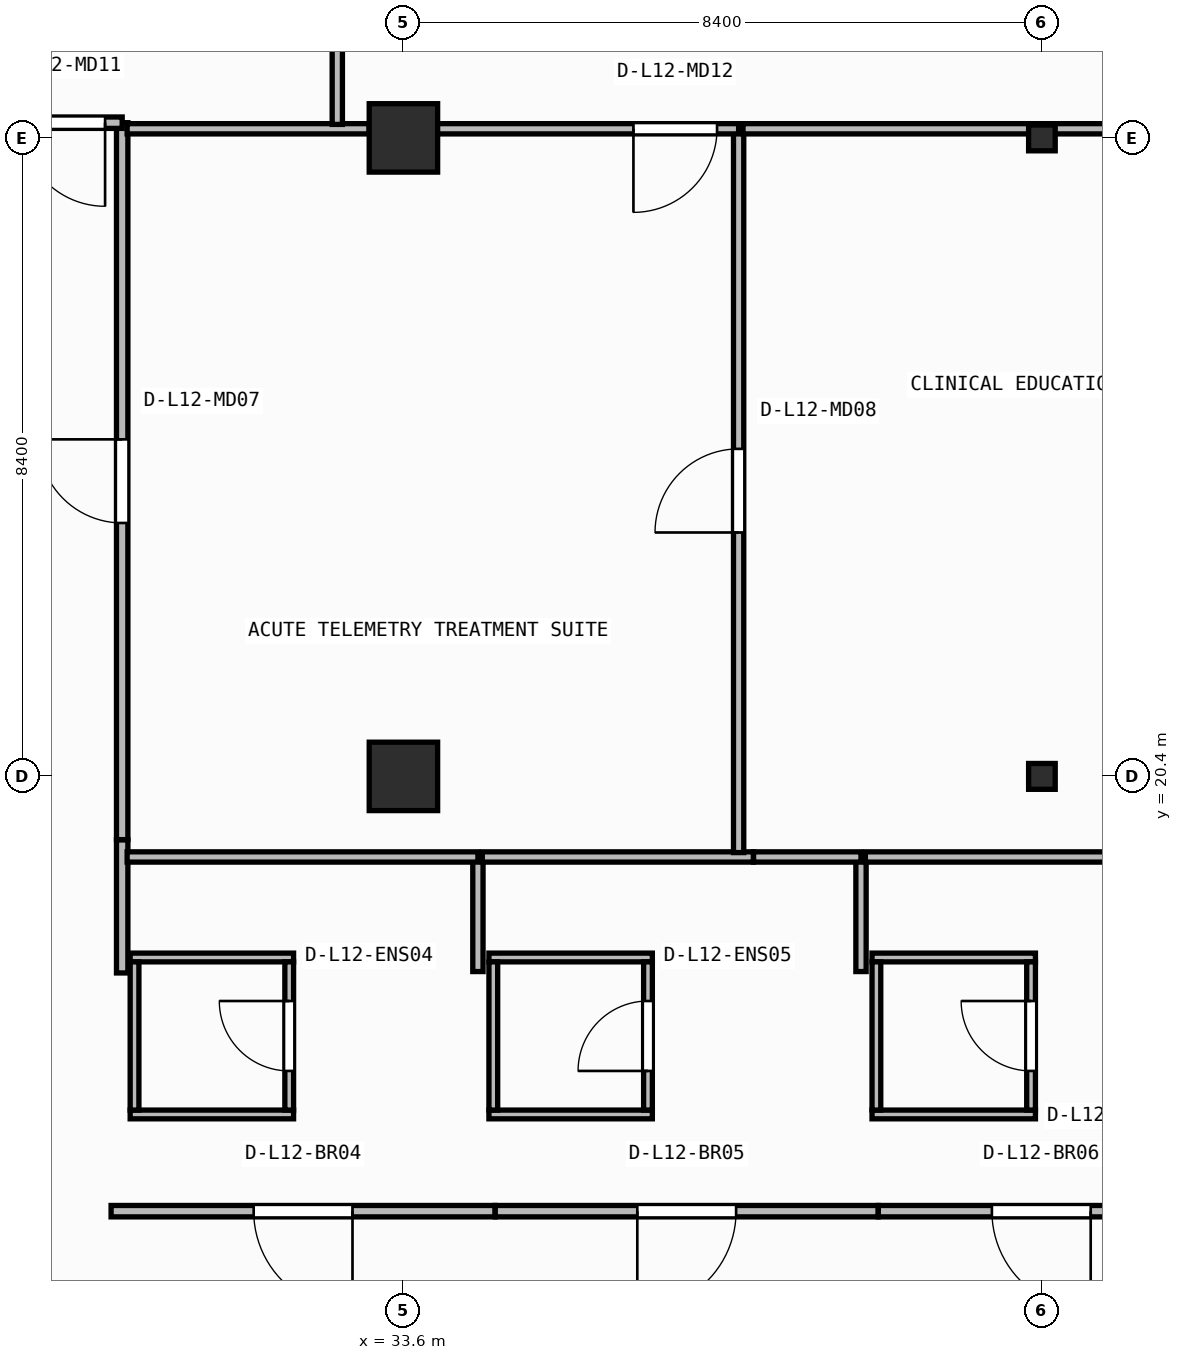
"""IFC4 building model, lengths in metres.
Left out: names, types, materials, properties, quantities, classifications, styles, units other than length and angle.
Written with IfcOpenShell. Run it as: python <this file> out.ifc"""

import sys

from ifc_helpers import new_model, si_unit, direction, frame, frame_2d, origin, origin_2d, place, context, subcontext, project, spatial, rectangle, i_section, extrude, element, fill, save


model = new_model("IFC4")
c1 = context("Model", 3, precision=1e-05, world=origin(), true_north=direction((0.0, 1.0)))
c2 = subcontext(c1, "Body", "Model", "MODEL_VIEW")
j1 = project(units=[si_unit("LENGTHUNIT", "METRE"), si_unit("PLANEANGLEUNIT", "RADIAN")], contexts=[c1])
p1 = place(None, origin())
s1 = spatial("IfcSite", under=j1, at=p1, CompositionType="ELEMENT")
p2 = place(p1, origin())
s2 = spatial("IfcBuilding", under=s1, at=p2, CompositionType="ELEMENT")
p3 = place(p2, frame((0.0, 0.0, 50.15)))
s3 = spatial("IfcBuildingStorey", under=s2, at=p3, CompositionType="ELEMENT", Elevation=50.15)
p4 = place(p3, frame((33.6, 20.4, 0.0), z_axis=(0.0, 0.0, 1.0), x_axis=(1.0, 0.0, 0.0)))
e1 = element("IfcColumn", 1, at=p4, inside=s3, PredefinedType="COLUMN", context=c2, shape_type="SweptSolid", body=[
    extrude(rectangle(XDim=0.9, YDim=0.9, at=origin_2d()), origin(), (0.0, 0.0, 1.0), 3.95),
])
p5 = place(p3, frame((42.0, 20.4, 0.0), z_axis=(0.0, 0.0, 1.0), x_axis=(1.0, 0.0, 0.0)))
e2 = element("IfcColumn", 2, at=p5, inside=s3, PredefinedType="COLUMN", context=c2, shape_type="SweptSolid", body=[
    extrude(i_section(OverallWidth=0.35, OverallDepth=0.34, WebThickness=0.016, FlangeThickness=0.028, at=origin_2d()), origin(), (0.0, 0.0, 1.0), 3.95),
])
p6 = place(p3, frame((33.6, 28.8, 0.0), z_axis=(0.0, 0.0, 1.0), x_axis=(1.0, 0.0, 0.0)))
e3 = element("IfcColumn", 3, at=p6, inside=s3, PredefinedType="COLUMN", context=c2, shape_type="SweptSolid", body=[
    extrude(rectangle(XDim=0.9, YDim=0.9, at=origin_2d()), origin(), (0.0, 0.0, 1.0), 3.95),
])
p7 = place(p3, frame((42.0, 28.8, 0.0), z_axis=(0.0, 0.0, 1.0), x_axis=(1.0, 0.0, 0.0)))
e4 = element("IfcColumn", 4, at=p7, inside=s3, PredefinedType="COLUMN", context=c2, shape_type="SweptSolid", body=[
    extrude(i_section(OverallWidth=0.35, OverallDepth=0.34, WebThickness=0.016, FlangeThickness=0.028, at=origin_2d()), origin(), (0.0, 0.0, 1.0), 3.95),
])
p8 = place(p3, frame((30.005, 15.952, 0.0), z_axis=(0.0, 0.0, 1.0), x_axis=(1.0, 0.0, 0.0)))
e5 = element("IfcWall", 5, at=p8, inside=s3, PredefinedType="PARTITIONING", context=c2, shape_type="SweptSolid", body=[
    extrude(rectangle(XDim=2.15, YDim=0.115, at=frame_2d((1.075, 0.0))), origin(), (0.0, 0.0, 1.0), 3.329),
])
p9 = place(p3, frame((30.005, 18.018, 0.0), z_axis=(0.0, 0.0, 1.0), x_axis=(1.0, 0.0, 0.0)))
e6 = element("IfcWall", 6, at=p9, inside=s3, PredefinedType="PARTITIONING", context=c2, shape_type="SweptSolid", body=[
    extrude(rectangle(XDim=2.15, YDim=0.115, at=frame_2d((1.075, 0.0))), origin(), (0.0, 0.0, 1.0), 3.71),
])
p10 = place(p3, frame((30.062, 16.01, 0.0), z_axis=(0.0, 0.0, 1.0), x_axis=(0.0, 1.0, 0.0)))
e7 = element("IfcWall", 7, at=p10, inside=s3, PredefinedType="PARTITIONING", context=c2, shape_type="SweptSolid", body=[
    extrude(rectangle(XDim=1.95, YDim=0.115, at=frame_2d((0.975, 0.0))), origin(), (0.0, 0.0, 1.0), 3.71),
])
p11 = place(p3, frame((32.097, 16.01, 0.0), z_axis=(0.0, 0.0, 1.0), x_axis=(0.0, 1.0, 0.0)))
e8 = element("IfcWall", 8, at=p11, inside=s3, PredefinedType="PARTITIONING", context=c2, shape_type="SweptSolid", body=[
    extrude(rectangle(XDim=1.95, YDim=0.115, at=frame_2d((0.975, 0.0))), origin(), (0.0, 0.0, 1.0), 3.71),
])
p12 = place(p11, frame((0.515, 0.0, 0.0)))
e9 = element("IfcOpeningElement", 9, at=p12, cuts=e8, PredefinedType="OPENING", context=c2, shape_type="SweptSolid", body=[
    extrude(rectangle(XDim=0.92, YDim=2.1, at=frame_2d((0.46, 1.05))), frame((0.0, 0.067, 0.0), z_axis=(0.0, -1.0, 0.0), x_axis=(1.0, 0.0, 0.0)), (0.0, 0.0, 1.0), 0.135),
])
p13 = place(p3, frame((34.725, 15.952, 0.0), z_axis=(0.0, 0.0, 1.0), x_axis=(1.0, 0.0, 0.0)))
e10 = element("IfcWall", 10, at=p13, inside=s3, PredefinedType="PARTITIONING", context=c2, shape_type="SweptSolid", body=[
    extrude(rectangle(XDim=2.15, YDim=0.115, at=frame_2d((1.075, 0.0))), origin(), (0.0, 0.0, 1.0), 3.329),
])
p14 = place(p3, frame((34.725, 18.018, 0.0), z_axis=(0.0, 0.0, 1.0), x_axis=(1.0, 0.0, 0.0)))
e11 = element("IfcWall", 11, at=p14, inside=s3, PredefinedType="PARTITIONING", context=c2, shape_type="SweptSolid", body=[
    extrude(rectangle(XDim=2.15, YDim=0.115, at=frame_2d((1.075, 0.0))), origin(), (0.0, 0.0, 1.0), 3.71),
])
p15 = place(p3, frame((34.782, 16.01, 0.0), z_axis=(0.0, 0.0, 1.0), x_axis=(0.0, 1.0, 0.0)))
e12 = element("IfcWall", 12, at=p15, inside=s3, PredefinedType="PARTITIONING", context=c2, shape_type="SweptSolid", body=[
    extrude(rectangle(XDim=1.95, YDim=0.115, at=frame_2d((0.975, 0.0))), origin(), (0.0, 0.0, 1.0), 3.71),
])
p16 = place(p3, frame((36.817, 16.01, 0.0), z_axis=(0.0, 0.0, 1.0), x_axis=(0.0, 1.0, 0.0)))
e13 = element("IfcWall", 13, at=p16, inside=s3, PredefinedType="PARTITIONING", context=c2, shape_type="SweptSolid", body=[
    extrude(rectangle(XDim=1.95, YDim=0.115, at=frame_2d((0.975, 0.0))), origin(), (0.0, 0.0, 1.0), 3.71),
])
p17 = place(p16, frame((0.515, 0.0, 0.0)))
e14 = element("IfcOpeningElement", 14, at=p17, cuts=e13, PredefinedType="OPENING", context=c2, shape_type="SweptSolid", body=[
    extrude(rectangle(XDim=0.92, YDim=2.1, at=frame_2d((0.46, 1.05))), frame((0.0, 0.067, 0.0), z_axis=(0.0, -1.0, 0.0), x_axis=(1.0, 0.0, 0.0)), (0.0, 0.0, 1.0), 0.135),
])
p18 = place(p3, frame((39.765, 15.952, 0.0), z_axis=(0.0, 0.0, 1.0), x_axis=(1.0, 0.0, 0.0)))
e15 = element("IfcWall", 15, at=p18, inside=s3, PredefinedType="PARTITIONING", context=c2, shape_type="SweptSolid", body=[
    extrude(rectangle(XDim=2.15, YDim=0.115, at=frame_2d((1.075, 0.0))), origin(), (0.0, 0.0, 1.0), 3.329),
])
p19 = place(p3, frame((39.765, 18.018, 0.0), z_axis=(0.0, 0.0, 1.0), x_axis=(1.0, 0.0, 0.0)))
e16 = element("IfcWall", 16, at=p19, inside=s3, PredefinedType="PARTITIONING", context=c2, shape_type="SweptSolid", body=[
    extrude(rectangle(XDim=2.15, YDim=0.115, at=frame_2d((1.075, 0.0))), origin(), (0.0, 0.0, 1.0), 3.71),
])
p20 = place(p3, frame((39.823, 16.01, 0.0), z_axis=(0.0, 0.0, 1.0), x_axis=(0.0, 1.0, 0.0)))
e17 = element("IfcWall", 17, at=p20, inside=s3, PredefinedType="PARTITIONING", context=c2, shape_type="SweptSolid", body=[
    extrude(rectangle(XDim=1.95, YDim=0.115, at=frame_2d((0.975, 0.0))), origin(), (0.0, 0.0, 1.0), 3.71),
])
p21 = place(p3, frame((41.857, 16.01, 0.0), z_axis=(0.0, 0.0, 1.0), x_axis=(0.0, 1.0, 0.0)))
e18 = element("IfcWall", 18, at=p21, inside=s3, PredefinedType="PARTITIONING", context=c2, shape_type="SweptSolid", body=[
    extrude(rectangle(XDim=1.95, YDim=0.115, at=frame_2d((0.975, 0.0))), origin(), (0.0, 0.0, 1.0), 3.073),
])
p22 = place(p21, frame((0.515, 0.0, 0.0)))
e19 = element("IfcOpeningElement", 19, at=p22, cuts=e18, PredefinedType="OPENING", context=c2, shape_type="SweptSolid", body=[
    extrude(rectangle(XDim=0.92, YDim=2.1, at=frame_2d((0.46, 1.05))), frame((0.0, 0.067, 0.0), z_axis=(0.0, -1.0, 0.0), x_axis=(1.0, 0.0, 0.0)), (0.0, 0.0, 1.0), 0.135),
])
p23 = place(p3, frame((34.806, 14.68, 0.0), z_axis=(0.0, 0.0, 1.0), x_axis=(-1.0, 0.0, 0.0)))
e20 = element("IfcWall", 20, at=p23, inside=s3, PredefinedType="PARTITIONING", context=c2, shape_type="SweptSolid", body=[
    extrude(rectangle(XDim=5.052, YDim=0.15, at=frame_2d((2.526, 0.0))), origin(), (0.0, 0.0, 1.0), 3.71),
])
p24 = place(p23, frame((1.876, 0.0, 0.0)))
e21 = element("IfcOpeningElement", 21, at=p24, cuts=e20, PredefinedType="OPENING", context=c2, shape_type="SweptSolid", body=[
    extrude(rectangle(XDim=1.3, YDim=2.15, at=frame_2d((0.65, 1.075))), frame((0.0, 0.085, 0.0), z_axis=(0.0, -1.0, 0.0), x_axis=(1.0, 0.0, 0.0)), (0.0, 0.0, 1.0), 0.17),
])
p25 = place(p3, frame((39.846, 14.68, 0.0), z_axis=(0.0, 0.0, 1.0), x_axis=(-1.0, 0.0, 0.0)))
e22 = element("IfcWall", 22, at=p25, inside=s3, PredefinedType="PARTITIONING", context=c2, shape_type="SweptSolid", body=[
    extrude(rectangle(XDim=5.038, YDim=0.15, at=frame_2d((2.519, 0.0))), origin(), (0.0, 0.0, 1.0), 3.71),
])
p26 = place(p25, frame((1.869, 0.0, 0.0)))
e23 = element("IfcOpeningElement", 23, at=p26, cuts=e22, PredefinedType="OPENING", context=c2, shape_type="SweptSolid", body=[
    extrude(rectangle(XDim=1.3, YDim=2.15, at=frame_2d((0.65, 1.075))), frame((0.0, 0.085, 0.0), z_axis=(0.0, -1.0, 0.0), x_axis=(1.0, 0.0, 0.0)), (0.0, 0.0, 1.0), 0.17),
])
p27 = place(p3, frame((44.136, 14.68, 0.0), z_axis=(0.0, 0.0, 1.0), x_axis=(-1.0, 0.0, 0.0)))
e24 = element("IfcWall", 24, at=p27, inside=s3, PredefinedType="PARTITIONING", context=c2, shape_type="SweptSolid", body=[
    extrude(rectangle(XDim=4.288, YDim=0.15, at=frame_2d((2.144, 0.0))), origin(), (0.0, 0.0, 1.0), 3.71),
])
p28 = place(p27, frame((1.494, 0.0, 0.0)))
e25 = element("IfcOpeningElement", 25, at=p28, cuts=e24, PredefinedType="OPENING", context=c2, shape_type="SweptSolid", body=[
    extrude(rectangle(XDim=1.3, YDim=2.15, at=frame_2d((0.65, 1.075))), frame((0.0, 0.085, 0.0), z_axis=(0.0, -1.0, 0.0), x_axis=(1.0, 0.0, 0.0)), (0.0, 0.0, 1.0), 0.17),
])
p29 = place(p3, frame((29.9, 17.814, 0.0), z_axis=(0.0, 0.0, 1.0), x_axis=(0.0, 1.0, 0.0)))
e26 = element("IfcWall", 26, at=p29, inside=s3, PredefinedType="PARTITIONING", context=c2, shape_type="SweptSolid", body=[
    extrude(rectangle(XDim=1.752, YDim=0.15, at=frame_2d((0.876, 0.0))), origin(), (0.0, 0.0, 1.0), 3.71),
])
p30 = place(p3, frame((29.9, 19.568, 0.0), z_axis=(0.0, 0.0, 1.0), x_axis=(0.0, 1.0, 0.0)))
e27 = element("IfcWall", 27, at=p30, inside=s3, PredefinedType="PARTITIONING", context=c2, shape_type="SweptSolid", body=[
    extrude(rectangle(XDim=9.432, YDim=0.15, at=frame_2d((4.716, 0.0))), origin(), (0.0, 0.0, 1.0), 3.71),
])
p31 = place(p30, frame((4.166, 0.0, 0.0)))
e28 = element("IfcOpeningElement", 28, at=p31, cuts=e27, PredefinedType="OPENING", context=c2, shape_type="SweptSolid", body=[
    extrude(rectangle(XDim=1.1, YDim=2.1, at=frame_2d((0.55, 1.05))), frame((0.0, 0.085, 0.0), z_axis=(0.0, -1.0, 0.0), x_axis=(1.0, 0.0, 0.0)), (0.0, 0.0, 1.0), 0.17),
])
p32 = place(p3, frame((29.9, 29.0, 0.0), z_axis=(0.0, 0.0, 1.0), x_axis=(-1.0, 0.0, 0.0)))
e29 = element("IfcWall", 29, at=p32, inside=s3, PredefinedType="PARTITIONING", context=c2, shape_type="SweptSolid", body=[
    extrude(rectangle(XDim=2.5, YDim=0.15, at=frame_2d((1.25, 0.0))), origin(), (0.0, 0.0, 1.0), 3.279),
])
p33 = place(p32, frame((0.225, 0.0, 0.0)))
e30 = element("IfcOpeningElement", 30, at=p33, cuts=e29, PredefinedType="OPENING", context=c2, shape_type="SweptSolid", body=[
    extrude(rectangle(XDim=1.1, YDim=2.1, at=frame_2d((0.55, 1.05))), frame((0.0, 0.085, 0.0), z_axis=(0.0, -1.0, 0.0), x_axis=(1.0, 0.0, 0.0)), (0.0, 0.0, 1.0), 0.17),
])
p34 = place(p3, frame((34.58, 17.833, 0.0), z_axis=(0.0, 0.0, 1.0), x_axis=(0.0, 1.0, 0.0)))
e31 = element("IfcWall", 31, at=p34, inside=s3, PredefinedType="PARTITIONING", context=c2, shape_type="SweptSolid", body=[
    extrude(rectangle(XDim=1.508, YDim=0.135, at=frame_2d((0.754, 0.0))), origin(), (0.0, 0.0, 1.0), 3.71),
])
p35 = place(p3, frame((34.58, 19.34, 0.0), z_axis=(0.0, 0.0, 1.0), x_axis=(-1.0, 0.0, 0.0)))
e32 = element("IfcWall", 32, at=p35, inside=s3, PredefinedType="PARTITIONING", context=c2, shape_type="SweptSolid", body=[
    extrude(rectangle(XDim=4.615, YDim=0.135, at=frame_2d((2.308, 0.0))), origin(), (0.0, 0.0, 1.0), 3.71),
])
p36 = place(p3, frame((39.62, 17.833, 0.0), z_axis=(0.0, 0.0, 1.0), x_axis=(0.0, 1.0, 0.0)))
e33 = element("IfcWall", 33, at=p36, inside=s3, PredefinedType="PARTITIONING", context=c2, shape_type="SweptSolid", body=[
    extrude(rectangle(XDim=1.508, YDim=0.135, at=frame_2d((0.754, 0.0))), origin(), (0.0, 0.0, 1.0), 3.71),
])
p37 = place(p3, frame((38.205, 19.34, 0.0), z_axis=(0.0, 0.0, 1.0), x_axis=(-1.0, 0.0, 0.0)))
e34 = element("IfcWall", 34, at=p37, inside=s3, PredefinedType="PARTITIONING", context=c2, shape_type="SweptSolid", body=[
    extrude(rectangle(XDim=3.567, YDim=0.135, at=frame_2d((1.784, 0.0))), origin(), (0.0, 0.0, 1.0), 3.71),
])
p38 = place(p3, frame((39.62, 19.34, 0.0), z_axis=(0.0, 0.0, 1.0), x_axis=(-1.0, 0.0, 0.0)))
e35 = element("IfcWall", 35, at=p38, inside=s3, PredefinedType="PARTITIONING", context=c2, shape_type="SweptSolid", body=[
    extrude(rectangle(XDim=1.414, YDim=0.135, at=frame_2d((0.707, 0.0))), origin(), (0.0, 0.0, 1.0), 3.71),
])
p39 = place(p3, frame((43.91, 19.34, 0.0), z_axis=(0.0, 0.0, 1.0), x_axis=(-1.0, 0.0, 0.0)))
e36 = element("IfcWall", 36, at=p39, inside=s3, PredefinedType="PARTITIONING", context=c2, shape_type="SweptSolid", body=[
    extrude(rectangle(XDim=4.232, YDim=0.135, at=frame_2d((2.116, 0.0))), origin(), (0.0, 0.0, 1.0), 3.71),
])
p40 = place(p3, frame((38.01, 19.397, 0.0), z_axis=(0.0, 0.0, 1.0), x_axis=(0.0, 1.0, 0.0)))
e37 = element("IfcWall", 37, at=p40, inside=s3, PredefinedType="PARTITIONING", context=c2, shape_type="SweptSolid", body=[
    extrude(rectangle(XDim=9.522, YDim=0.135, at=frame_2d((4.761, 0.0))), origin(), (0.0, 0.0, 1.0), 3.71),
])
p41 = place(p40, frame((4.211, 0.0, 0.0)))
e38 = element("IfcOpeningElement", 38, at=p41, cuts=e37, PredefinedType="OPENING", context=c2, shape_type="SweptSolid", body=[
    extrude(rectangle(XDim=1.1, YDim=2.1, at=frame_2d((0.55, 1.05))), frame((0.0, 0.077, 0.0), z_axis=(0.0, -1.0, 0.0), x_axis=(1.0, 0.0, 0.0)), (0.0, 0.0, 1.0), 0.155),
])
p42 = place(p3, frame((33.15, 28.92, 0.0), z_axis=(0.0, 0.0, 1.0), x_axis=(-1.0, 0.0, 0.0)))
e39 = element("IfcWall", 39, at=p42, inside=s3, PredefinedType="PARTITIONING", context=c2, shape_type="SweptSolid", body=[
    extrude(rectangle(XDim=3.185, YDim=0.135, at=frame_2d((1.592, 0.0))), origin(), (0.0, 0.0, 1.0), 3.279),
])
p43 = place(p3, frame((38.01, 28.92, 0.0), z_axis=(0.0, 0.0, 1.0), x_axis=(-1.0, 0.0, 0.0)))
e40 = element("IfcWall", 40, at=p43, inside=s3, PredefinedType="PARTITIONING", context=c2, shape_type="SweptSolid", body=[
    extrude(rectangle(XDim=4.858, YDim=0.135, at=frame_2d((2.429, 0.0))), origin(), (0.0, 0.0, 1.0), 3.279),
])
p44 = place(p43, frame((0.284, 0.0, 0.0)))
e41 = element("IfcOpeningElement", 41, at=p44, cuts=e40, PredefinedType="OPENING", context=c2, shape_type="SweptSolid", body=[
    extrude(rectangle(XDim=1.1, YDim=2.1, at=frame_2d((0.55, 1.05))), frame((0.0, 0.077, 0.0), z_axis=(0.0, -1.0, 0.0), x_axis=(1.0, 0.0, 0.0)), (0.0, 0.0, 1.0), 0.155),
])
p45 = place(p3, frame((47.44, 28.92, 0.0), z_axis=(0.0, 0.0, 1.0), x_axis=(-1.0, 0.0, 0.0)))
e42 = element("IfcWall", 42, at=p45, inside=s3, PredefinedType="PARTITIONING", context=c2, shape_type="SweptSolid", body=[
    extrude(rectangle(XDim=9.373, YDim=0.135, at=frame_2d((4.686, 0.0))), origin(), (0.0, 0.0, 1.0), 3.073),
])
p46 = place(p3, frame((32.73, 28.978, 0.0), z_axis=(0.0, 0.0, 1.0), x_axis=(0.0, 1.0, 0.0)))
e43 = element("IfcWall", 43, at=p46, inside=s3, PredefinedType="PARTITIONING", context=c2, shape_type="SweptSolid", body=[
    extrude(rectangle(XDim=2.433, YDim=0.135, at=frame_2d((1.217, 0.0))), origin(), (0.0, 0.0, 1.0), 3.71),
])
p47 = place(p12, origin())
e44 = element("IfcDoor", 44, at=p47, inside=s3, OperationType="SINGLE_SWING_RIGHT", PredefinedType="DOOR", context=c2, shape_type="SweptSolid", body=[
    extrude(rectangle(XDim=0.92, YDim=2.1, at=frame_2d((0.46, 1.05))), frame((0.0, 0.025, 0.0), z_axis=(0.0, -1.0, 0.0), x_axis=(1.0, 0.0, 0.0)), (0.0, 0.0, 1.0), 0.05),
])
fill(e9, e44)
p48 = place(p17, origin())
e45 = element("IfcDoor", 45, at=p48, inside=s3, OperationType="SINGLE_SWING_LEFT", PredefinedType="DOOR", context=c2, shape_type="SweptSolid", body=[
    extrude(rectangle(XDim=0.92, YDim=2.1, at=frame_2d((0.46, 1.05))), frame((0.0, 0.025, 0.0), z_axis=(0.0, -1.0, 0.0), x_axis=(1.0, 0.0, 0.0)), (0.0, 0.0, 1.0), 0.05),
])
fill(e14, e45)
p49 = place(p22, origin())
e46 = element("IfcDoor", 46, at=p49, inside=s3, OperationType="SINGLE_SWING_RIGHT", PredefinedType="DOOR", context=c2, shape_type="SweptSolid", body=[
    extrude(rectangle(XDim=0.92, YDim=2.1, at=frame_2d((0.46, 1.05))), frame((0.0, 0.025, 0.0), z_axis=(0.0, -1.0, 0.0), x_axis=(1.0, 0.0, 0.0)), (0.0, 0.0, 1.0), 0.05),
])
fill(e19, e46)
p50 = place(p24, origin())
e47 = element("IfcDoor", 47, at=p50, inside=s3, OperationType="SINGLE_SWING_LEFT", PredefinedType="DOOR", context=c2, shape_type="SweptSolid", body=[
    extrude(rectangle(XDim=1.3, YDim=2.15, at=frame_2d((0.65, 1.075))), frame((0.0, 0.025, 0.0), z_axis=(0.0, -1.0, 0.0), x_axis=(1.0, 0.0, 0.0)), (0.0, 0.0, 1.0), 0.05),
])
fill(e21, e47)
p51 = place(p26, origin())
e48 = element("IfcDoor", 48, at=p51, inside=s3, OperationType="SINGLE_SWING_RIGHT", PredefinedType="DOOR", context=c2, shape_type="SweptSolid", body=[
    extrude(rectangle(XDim=1.3, YDim=2.15, at=frame_2d((0.65, 1.075))), frame((0.0, 0.025, 0.0), z_axis=(0.0, -1.0, 0.0), x_axis=(1.0, 0.0, 0.0)), (0.0, 0.0, 1.0), 0.05),
])
fill(e23, e48)
p52 = place(p28, origin())
e49 = element("IfcDoor", 49, at=p52, inside=s3, OperationType="SINGLE_SWING_LEFT", PredefinedType="DOOR", context=c2, shape_type="SweptSolid", body=[
    extrude(rectangle(XDim=1.3, YDim=2.15, at=frame_2d((0.65, 1.075))), frame((0.0, 0.025, 0.0), z_axis=(0.0, -1.0, 0.0), x_axis=(1.0, 0.0, 0.0)), (0.0, 0.0, 1.0), 0.05),
])
fill(e25, e49)
p53 = place(p31, origin())
e50 = element("IfcDoor", 50, at=p53, inside=s3, OperationType="SINGLE_SWING_RIGHT", PredefinedType="DOOR", context=c2, shape_type="SweptSolid", body=[
    extrude(rectangle(XDim=1.1, YDim=2.1, at=frame_2d((0.55, 1.05))), frame((0.0, 0.025, 0.0), z_axis=(0.0, -1.0, 0.0), x_axis=(1.0, 0.0, 0.0)), (0.0, 0.0, 1.0), 0.05),
])
fill(e28, e50)
p54 = place(p33, origin())
e51 = element("IfcDoor", 51, at=p54, inside=s3, OperationType="SINGLE_SWING_LEFT", PredefinedType="DOOR", context=c2, shape_type="SweptSolid", body=[
    extrude(rectangle(XDim=1.1, YDim=2.1, at=frame_2d((0.55, 1.05))), frame((0.0, 0.025, 0.0), z_axis=(0.0, -1.0, 0.0), x_axis=(1.0, 0.0, 0.0)), (0.0, 0.0, 1.0), 0.05),
])
fill(e30, e51)
p55 = place(p41, origin())
e52 = element("IfcDoor", 52, at=p55, inside=s3, OperationType="SINGLE_SWING_LEFT", PredefinedType="DOOR", context=c2, shape_type="SweptSolid", body=[
    extrude(rectangle(XDim=1.1, YDim=2.1, at=frame_2d((0.55, 1.05))), frame((0.0, 0.025, 0.0), z_axis=(0.0, -1.0, 0.0), x_axis=(1.0, 0.0, 0.0)), (0.0, 0.0, 1.0), 0.05),
])
fill(e38, e52)
p56 = place(p44, origin())
e53 = element("IfcDoor", 53, at=p56, inside=s3, OperationType="SINGLE_SWING_RIGHT", PredefinedType="DOOR", context=c2, shape_type="SweptSolid", body=[
    extrude(rectangle(XDim=1.1, YDim=2.1, at=frame_2d((0.55, 1.05))), frame((0.0, 0.025, 0.0), z_axis=(0.0, -1.0, 0.0), x_axis=(1.0, 0.0, 0.0)), (0.0, 0.0, 1.0), 0.05),
])
fill(e41, e53)
save(model, sys.argv[1])
